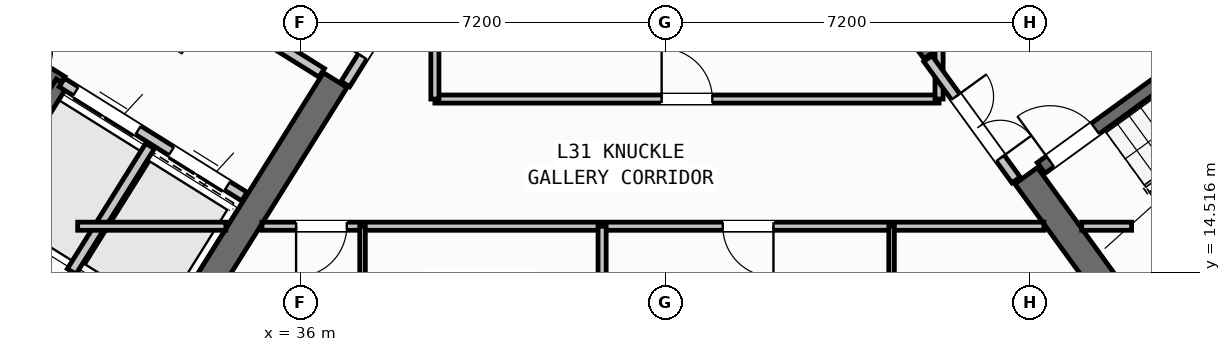
"""IFC4 building model, lengths in metres.
Left out: names, types, materials, properties, quantities, classifications, styles, units other than length and angle.
Written with IfcOpenShell. Run it as: python <this file> out.ifc"""

import sys

from ifc_helpers import new_model, si_unit, direction, frame, frame_2d, origin, place, context, subcontext, project, spatial, rectangle, extrude, source, transform, mapped, element, fill, save


model = new_model("IFC4")
c1 = context("Model", 3, precision=1e-05, world=origin(), true_north=direction((0.0, 1.0)))
c2 = subcontext(c1, "Body", "Model", "MODEL_VIEW")
j1 = project(units=[si_unit("LENGTHUNIT", "METRE"), si_unit("PLANEANGLEUNIT", "RADIAN")], contexts=[c1])
p1 = place(None, origin())
s1 = spatial("IfcSite", under=j1, at=p1, CompositionType="ELEMENT")
p2 = place(p1, origin())
s2 = spatial("IfcBuilding", under=s1, at=p2, CompositionType="ELEMENT")
p3 = place(p2, frame((0.0, 0.0, 123.3)))
s3 = spatial("IfcBuildingStorey", under=s2, at=p3, CompositionType="ELEMENT", Elevation=123.3)
p4 = place(p3, frame((33.366, 12.477, 0.0), z_axis=(0.0, 0.0, 1.0), x_axis=(-0.848047359947, 0.529920442413, 0.0)))
e1 = element("IfcWall", 1, at=p4, inside=s3, PredefinedType="SHEAR", context=c2, shape_type="SweptSolid", body=[
    extrude(rectangle(XDim=13.14, YDim=0.55, at=frame_2d((6.57, 0.0))), origin(), (0.0, 0.0, 1.0), 4.22),
])
p5 = place(p3, frame((36.683, 18.304, 0.0), z_axis=(0.0, 0.0, 1.0), x_axis=(-0.529896466841, -0.848062341122, 0.0)))
e2 = element("IfcWall", 2, at=p5, inside=s3, PredefinedType="SHEAR", context=c2, shape_type="SweptSolid", body=[
    extrude(rectangle(XDim=6.425, YDim=0.55, at=frame_2d((3.212, 0.0))), origin(), (0.0, 0.0, 1.0), 4.22),
])
p6 = place(p3, frame((52.359, 13.14, 0.0), z_axis=(0.0, 0.0, 1.0), x_axis=(0.809014896919, 0.587788139183, 0.0)))
e3 = element("IfcWall", 3, at=p6, inside=s3, PredefinedType="SHEAR", context=c2, shape_type="SweptSolid", body=[
    extrude(rectangle(XDim=12.34, YDim=0.55, at=frame_2d((6.17, 0.0))), origin(), (0.0, 0.0, 1.0), 4.22),
])
p7 = place(p3, frame((52.42, 13.524, 0.0), z_axis=(0.0, 0.0, 1.0), x_axis=(-0.587802113096, 0.809004744015, 0.0)))
e4 = element("IfcWall", 4, at=p7, inside=s3, PredefinedType="SHEAR", context=c2, shape_type="SweptSolid", body=[
    extrude(rectangle(XDim=3.575, YDim=0.55, at=frame_2d((1.788, 0.0))), origin(), (0.0, 0.0, 1.0), 4.22),
])
p8 = place(p3, frame((48.526, 18.884, 0.0), z_axis=(0.0, 0.0, 1.0), x_axis=(-0.587764933797, 0.809031756236, 0.0)))
e5 = element("IfcWall", 5, at=p8, inside=s3, PredefinedType="SHEAR", context=c2, shape_type="SweptSolid", body=[
    extrude(rectangle(XDim=6.425, YDim=0.55, at=frame_2d((3.212, 0.0))), origin(), (0.0, 0.0, 1.0), 4.22),
])
p9 = place(p3, frame((31.76, 12.183, 0.0), z_axis=(0.0, 0.0, 1.0), x_axis=(-0.848047074256, 0.529920899612, 0.0)))
e6 = element("IfcWall", 6, at=p9, inside=s3, PredefinedType="STANDARD", context=c2, shape_type="SweptSolid", body=[
    extrude(rectangle(XDim=30.652, YDim=0.32, at=frame_2d((15.326, 0.0))), origin(), (0.0, 0.0, 1.0), 4.22),
])
p10 = place(p9, frame((14.966, 0.0, 0.0)))
e7 = element("IfcOpeningElement", 7, at=p10, cuts=e6, PredefinedType="OPENING", context=c2, shape_type="SweptSolid", body=[
    extrude(rectangle(XDim=1.2, YDim=2.15, at=frame_2d((0.6, 1.075))), frame((0.0, 0.17, 0.0), z_axis=(0.0, -1.0, 0.0), x_axis=(1.0, 0.0, 0.0)), (0.0, 0.0, 1.0), 0.34),
])
p11 = place(p9, frame((1.871, 0.0, 0.8)))
e8 = element("IfcOpeningElement", 8, at=p11, cuts=e6, PredefinedType="OPENING", context=c2, shape_type="SweptSolid", body=[
    extrude(rectangle(XDim=2.1, YDim=1.55, at=frame_2d((1.05, 0.775))), frame((0.0, 0.17, 0.0), z_axis=(0.0, -1.0, 0.0), x_axis=(1.0, 0.0, 0.0)), (0.0, 0.0, 1.0), 0.34),
])
p12 = place(p9, frame((6.546, 0.0, 0.8)))
e9 = element("IfcOpeningElement", 9, at=p12, cuts=e6, PredefinedType="OPENING", context=c2, shape_type="SweptSolid", body=[
    extrude(rectangle(XDim=2.1, YDim=1.55, at=frame_2d((1.05, 0.775))), frame((0.0, 0.17, 0.0), z_axis=(0.0, -1.0, 0.0), x_axis=(1.0, 0.0, 0.0)), (0.0, 0.0, 1.0), 0.34),
])
p13 = place(p9, frame((20.508, 0.0, 0.85)))
e10 = element("IfcOpeningElement", 10, at=p13, cuts=e6, PredefinedType="OPENING", context=c2, shape_type="SweptSolid", body=[
    extrude(rectangle(XDim=1.5, YDim=1.5, at=frame_2d((0.75, 0.75))), frame((0.0, 0.17, 0.0), z_axis=(0.0, -1.0, 0.0), x_axis=(1.0, 0.0, 0.0)), (0.0, 0.0, 1.0), 0.34),
])
p14 = place(p9, frame((27.253, 0.0, 0.95)))
e11 = element("IfcOpeningElement", 11, at=p14, cuts=e6, PredefinedType="OPENING", context=c2, shape_type="SweptSolid", body=[
    extrude(rectangle(XDim=1.2, YDim=1.4, at=frame_2d((0.6, 0.7))), frame((0.0, 0.17, 0.0), z_axis=(0.0, -1.0, 0.0), x_axis=(1.0, 0.0, 0.0)), (0.0, 0.0, 1.0), 0.34),
])
p15 = place(p3, frame((31.28, 18.261, 0.0), z_axis=(0.0, 0.0, 1.0), x_axis=(-0.848051618787, 0.529913626805, 0.0)))
e12 = element("IfcWall", 12, at=p15, inside=s3, PredefinedType="SHEAR", context=c2, shape_type="SweptSolid", body=[
    extrude(rectangle(XDim=7.46, YDim=0.26, at=frame_2d((3.73, 0.0))), origin(), (0.0, 0.0, 1.0), 4.22),
])
p16 = place(p15, frame((0.36, 0.0, 0.0)))
e13 = element("IfcOpeningElement", 13, at=p16, cuts=e12, PredefinedType="OPENING", context=c2, shape_type="SweptSolid", body=[
    extrude(rectangle(XDim=0.86, YDim=2.05, at=frame_2d((0.43, 1.025))), frame((0.0, 0.14, 0.0), z_axis=(0.0, -1.0, 0.0), x_axis=(1.0, 0.0, 0.0)), (0.0, 0.0, 1.0), 0.28),
])
p17 = place(p3, frame((31.288, 18.256, 0.0), z_axis=(0.0, 0.0, 1.0), x_axis=(-0.529943379326, -0.848033026897, 0.0)))
e14 = element("IfcWall", 14, at=p17, inside=s3, PredefinedType="SHEAR", context=c2, shape_type="SweptSolid", body=[
    extrude(rectangle(XDim=3.16, YDim=0.26, at=frame_2d((1.58, 0.0))), origin(), (0.0, 0.0, 1.0), 4.22),
])
p18 = place(p3, frame((34.891, 16.005, 0.0), z_axis=(0.0, 0.0, 1.0), x_axis=(-0.848062873452, 0.529895614884, 0.0)))
e15 = element("IfcWall", 15, at=p18, inside=s3, PredefinedType="STANDARD", context=c2, shape_type="SweptSolid", body=[
    extrude(rectangle(XDim=4.248, YDim=0.2, at=frame_2d((2.124, 0.0))), origin(), (0.0, 0.0, 1.0), 4.21),
])
p19 = place(p18, frame((0.398, 0.0, 0.0)))
e16 = element("IfcOpeningElement", 16, at=p19, cuts=e15, PredefinedType="OPENING", context=c2, shape_type="SweptSolid", body=[
    extrude(rectangle(XDim=1.3, YDim=2.2, at=frame_2d((0.65, 1.1))), frame((0.0, 0.11, 0.0), z_axis=(0.0, -1.0, 0.0), x_axis=(1.0, 0.0, 0.0)), (0.0, 0.0, 1.0), 0.22),
])
p20 = place(p18, frame((2.473, 0.0, 0.0)))
e17 = element("IfcOpeningElement", 17, at=p20, cuts=e15, PredefinedType="OPENING", context=c2, shape_type="SweptSolid", body=[
    extrude(rectangle(XDim=1.45, YDim=2.25, at=frame_2d((0.725, 1.125))), frame((0.0, 0.11, 0.0), z_axis=(0.0, -1.0, 0.0), x_axis=(1.0, 0.0, 0.0)), (0.0, 0.0, 1.0), 0.22),
])
p21 = place(p3, frame((36.417, 18.447, 0.0), z_axis=(0.0, 0.0, 1.0), x_axis=(-0.848064879198, 0.529892404805, 0.0)))
e18 = element("IfcWall", 18, at=p21, inside=s3, PredefinedType="STANDARD", context=c2, shape_type="SweptSolid", body=[
    extrude(rectangle(XDim=5.768, YDim=0.2, at=frame_2d((2.884, 0.0))), origin(), (0.0, 0.0, 1.0), 4.21),
])
p22 = place(p21, frame((2.548, 0.0, 0.0)))
e19 = element("IfcOpeningElement", 19, at=p22, cuts=e18, PredefinedType="OPENING", context=c2, shape_type="SweptSolid", body=[
    extrude(rectangle(XDim=1.15, YDim=2.1, at=frame_2d((0.575, 1.05))), frame((0.0, 0.11, 0.0), z_axis=(0.0, -1.0, 0.0), x_axis=(1.0, 0.0, 0.0)), (0.0, 0.0, 1.0), 0.22),
])
p23 = place(p3, frame((33.029, 17.003, 0.0), z_axis=(0.0, 0.0, 1.0), x_axis=(-0.529916267533, -0.848049968695, 0.0)))
e20 = element("IfcWall", 20, at=p23, inside=s3, PredefinedType="STANDARD", context=c2, shape_type="SweptSolid", body=[
    extrude(rectangle(XDim=2.92, YDim=0.2, at=frame_2d((1.46, 0.0))), origin(), (0.0, 0.0, 1.0), 4.21),
])
p24 = place(p3, frame((52.472, 14.013, 0.0), z_axis=(0.0, 0.0, 1.0), x_axis=(0.809028366311, 0.587769599847, 0.0)))
e21 = element("IfcWall", 21, at=p24, inside=s3, PredefinedType="SHEAR", context=c2, shape_type="SweptSolid", body=[
    extrude(rectangle(XDim=7.33, YDim=0.26, at=frame_2d((3.665, 0.0))), origin(), (0.0, 0.0, 1.0), 4.22),
])
p25 = place(p3, frame((50.615, 16.57, 0.0), z_axis=(0.0, 0.0, 1.0), x_axis=(0.809028366311, 0.587769599847, 0.0)))
e22 = element("IfcWall", 22, at=p25, inside=s3, PredefinedType="SHEAR", context=c2, shape_type="SweptSolid", body=[
    extrude(rectangle(XDim=7.33, YDim=0.26, at=frame_2d((3.665, 0.0))), origin(), (0.0, 0.0, 1.0), 4.22),
])
p26 = place(p25, frame((0.22, 0.0, 0.0)))
e23 = element("IfcOpeningElement", 23, at=p26, cuts=e22, PredefinedType="OPENING", context=c2, shape_type="SweptSolid", body=[
    extrude(rectangle(XDim=1.1, YDim=2.1, at=frame_2d((0.55, 1.05))), frame((0.0, 0.14, 0.0), z_axis=(0.0, -1.0, 0.0), x_axis=(1.0, 0.0, 0.0)), (0.0, 0.0, 1.0), 0.28),
])
p27 = place(p3, frame((38.451, 20.737, 0.0), z_axis=(0.0, 0.0, 1.0), x_axis=(-0.529924799939, -0.848044637038, 0.0)))
e24 = element("IfcWall", 24, at=p27, inside=s3, PredefinedType="STANDARD", context=c2, shape_type="SweptSolid", body=[
    extrude(rectangle(XDim=2.96, YDim=0.2, at=frame_2d((1.48, 0.0))), origin(), (0.0, 0.0, 1.0), 2.395),
])
p28 = place(p27, frame((1.46, 0.0, 0.0)))
e25 = element("IfcOpeningElement", 25, at=p28, cuts=e24, PredefinedType="OPENING", context=c2, shape_type="SweptSolid", body=[
    extrude(rectangle(XDim=0.86, YDim=2.05, at=frame_2d((0.43, 1.025))), frame((0.0, 0.11, 0.0), z_axis=(0.0, -1.0, 0.0), x_axis=(1.0, 0.0, 0.0)), (0.0, 0.0, 1.0), 0.22),
])
p29 = place(p3, frame((31.6, 15.42, 0.0), z_axis=(0.0, 0.0, 1.0), x_axis=(1.0, 0.0, 0.0)))
e26 = element("IfcWall", 26, at=p29, inside=s3, PredefinedType="PARTITIONING", context=c2, shape_type="SweptSolid", body=[
    extrude(rectangle(XDim=2.925, YDim=0.16, at=frame_2d((1.462, 0.0))), origin(), (0.0, 0.0, 1.0), 4.21),
])
p30 = place(p3, frame((35.237, 15.42, 0.0), z_axis=(0.0, 0.0, 1.0), x_axis=(1.0, 0.0, 0.0)))
e27 = element("IfcWall", 27, at=p30, inside=s3, PredefinedType="PARTITIONING", context=c2, shape_type="SweptSolid", body=[
    extrude(rectangle(XDim=15.432, YDim=0.16, at=frame_2d((7.716, 0.0))), origin(), (0.0, 0.0, 1.0), 4.21),
])
p31 = place(p30, frame((0.674, 0.0, 0.0)))
e28 = element("IfcOpeningElement", 28, at=p31, cuts=e27, PredefinedType="OPENING", context=c2, shape_type="SweptSolid", body=[
    extrude(rectangle(XDim=1.0, YDim=2.1, at=frame_2d((0.5, 1.05))), frame((0.0, 0.09, 0.0), z_axis=(0.0, -1.0, 0.0), x_axis=(1.0, 0.0, 0.0)), (0.0, 0.0, 1.0), 0.18),
])
p32 = place(p30, frame((9.094, 0.0, 0.0)))
e29 = element("IfcOpeningElement", 29, at=p32, cuts=e27, PredefinedType="OPENING", context=c2, shape_type="SweptSolid", body=[
    extrude(rectangle(XDim=1.0, YDim=2.1, at=frame_2d((0.5, 1.05))), frame((0.0, 0.09, 0.0), z_axis=(0.0, -1.0, 0.0), x_axis=(1.0, 0.0, 0.0)), (0.0, 0.0, 1.0), 0.18),
])
p33 = place(p3, frame((51.416, 15.42, 0.0), z_axis=(0.0, 0.0, 1.0), x_axis=(1.0, 0.0, 0.0)))
e30 = element("IfcWall", 30, at=p33, inside=s3, PredefinedType="PARTITIONING", context=c2, shape_type="SweptSolid", body=[
    extrude(rectangle(XDim=0.984, YDim=0.16, at=frame_2d((0.492, 0.0))), origin(), (0.0, 0.0, 1.0), 4.21),
])
p34 = place(p3, frame((38.65, 17.93, 0.0), z_axis=(0.0, 0.0, 1.0), x_axis=(1.0, 0.0, 0.0)))
e31 = element("IfcWall", 31, at=p34, inside=s3, PredefinedType="PARTITIONING", context=c2, shape_type="SweptSolid", body=[
    extrude(rectangle(XDim=9.95, YDim=0.16, at=frame_2d((4.975, 0.0))), origin(), (0.0, 0.0, 1.0), 4.21),
])
p35 = place(p34, frame((4.475, 0.0, 0.0)))
e32 = element("IfcOpeningElement", 32, at=p35, cuts=e31, PredefinedType="OPENING", context=c2, shape_type="SweptSolid", body=[
    extrude(rectangle(XDim=1.0, YDim=2.1, at=frame_2d((0.5, 1.05))), frame((0.0, 0.09, 0.0), z_axis=(0.0, -1.0, 0.0), x_axis=(1.0, 0.0, 0.0)), (0.0, 0.0, 1.0), 0.18),
])
p36 = place(p3, frame((38.65, 17.93, 0.0), z_axis=(0.0, 0.0, 1.0), x_axis=(0.0, 1.0, 0.0)))
e33 = element("IfcWall", 33, at=p36, inside=s3, PredefinedType="PARTITIONING", context=c2, shape_type="SweptSolid", body=[
    extrude(rectangle(XDim=2.951, YDim=0.16, at=frame_2d((1.476, 0.0))), origin(), (0.0, 0.0, 1.0), 4.21),
])
p37 = place(p3, frame((48.6, 17.93, 0.0), z_axis=(0.0, 0.0, 1.0), x_axis=(0.0, 1.0, 0.0)))
e34 = element("IfcWall", 34, at=p37, inside=s3, PredefinedType="PARTITIONING", context=c2, shape_type="SweptSolid", body=[
    extrude(rectangle(XDim=0.993, YDim=0.16, at=frame_2d((0.496, 0.0))), origin(), (0.0, 0.0, 1.0), 4.21),
])
p38 = place(p3, frame((50.119, 16.333, 0.0), z_axis=(0.0, 0.0, 1.0), x_axis=(-0.587749856981, 0.809042709391, 0.0)))
e35 = element("IfcWall", 35, at=p38, inside=s3, PredefinedType="STANDARD", context=c2, shape_type="SweptSolid", body=[
    extrude(rectangle(XDim=2.96, YDim=0.2, at=frame_2d((1.48, 0.0))), origin(), (0.0, 0.0, 1.0), 2.395),
])
p39 = place(p38, frame((0.53, 0.0, 0.0)))
e36 = element("IfcOpeningElement", 36, at=p39, cuts=e35, PredefinedType="OPENING", context=c2, shape_type="SweptSolid", body=[
    extrude(rectangle(XDim=1.5, YDim=2.15, at=frame_2d((0.75, 1.075))), frame((0.0, 0.11, 0.0), z_axis=(0.0, -1.0, 0.0), x_axis=(1.0, 0.0, 0.0)), (0.0, 0.0, 1.0), 0.22),
])
p40 = place(p3, frame((41.95, 1.96, 0.0), z_axis=(0.0, 0.0, 1.0), x_axis=(0.0, 1.0, 0.0)))
e37 = element("IfcWall", 37, at=p40, inside=s3, PredefinedType="PARTITIONING", context=c2, shape_type="SweptSolid", body=[
    extrude(rectangle(XDim=13.46, YDim=0.16, at=frame_2d((6.73, 0.0))), origin(), (0.0, 0.0, 1.0), 4.21),
])
p41 = place(p3, frame((37.222, 1.96, 0.0), z_axis=(0.0, 0.0, 1.0), x_axis=(0.0, 1.0, 0.0)))
e38 = element("IfcWall", 38, at=p41, inside=s3, PredefinedType="PARTITIONING", context=c2, shape_type="SweptSolid", body=[
    extrude(rectangle(XDim=13.46, YDim=0.11, at=frame_2d((6.73, 0.0))), origin(), (0.0, 0.0, 1.0), 4.21),
])
p42 = place(p41, frame((5.2, 0.0, 0.0)))
e39 = element("IfcOpeningElement", 39, at=p42, cuts=e38, PredefinedType="OPENING", context=c2, shape_type="SweptSolid", body=[
    extrude(rectangle(XDim=0.92, YDim=2.08, at=frame_2d((0.46, 1.04))), frame((0.0, 0.065, 0.0), z_axis=(0.0, -1.0, 0.0), x_axis=(1.0, 0.0, 0.0)), (0.0, 0.0, 1.0), 0.13),
])
p43 = place(p41, frame((10.45, 0.0, 0.0)))
e40 = element("IfcOpeningElement", 40, at=p43, cuts=e38, PredefinedType="OPENING", context=c2, shape_type="SweptSolid", body=[
    extrude(rectangle(XDim=0.88, YDim=2.08, at=frame_2d((0.44, 1.04))), frame((0.0, 0.065, 0.0), z_axis=(0.0, -1.0, 0.0), x_axis=(1.0, 0.0, 0.0)), (0.0, 0.0, 1.0), 0.13),
])
p44 = place(p3, frame((47.663, 1.96, 0.0), z_axis=(0.0, 0.0, 1.0), x_axis=(0.0, 1.0, 0.0)))
e41 = element("IfcWall", 41, at=p44, inside=s3, PredefinedType="PARTITIONING", context=c2, shape_type="SweptSolid", body=[
    extrude(rectangle(XDim=13.46, YDim=0.11, at=frame_2d((6.73, 0.0))), origin(), (0.0, 0.0, 1.0), 4.21),
])
p45 = place(p44, frame((6.3, 0.0, 0.0)))
e42 = element("IfcOpeningElement", 42, at=p45, cuts=e41, PredefinedType="OPENING", context=c2, shape_type="SweptSolid", body=[
    extrude(rectangle(XDim=0.92, YDim=2.08, at=frame_2d((0.46, 1.04))), frame((0.0, 0.065, 0.0), z_axis=(0.0, -1.0, 0.0), x_axis=(1.0, 0.0, 0.0)), (0.0, 0.0, 1.0), 0.13),
])
p46 = place(p44, frame((11.1, 0.0, 0.0)))
e43 = element("IfcOpeningElement", 43, at=p46, cuts=e41, PredefinedType="OPENING", context=c2, shape_type="SweptSolid", body=[
    extrude(rectangle(XDim=0.88, YDim=2.08, at=frame_2d((0.44, 1.04))), frame((0.0, 0.065, 0.0), z_axis=(0.0, -1.0, 0.0), x_axis=(1.0, 0.0, 0.0)), (0.0, 0.0, 1.0), 0.13),
])
m1 = source(origin(), c2, "Body", "SweptSolid", [
    extrude(rectangle(XDim=1.3, YDim=2.2, at=frame_2d((0.65, 1.1))), frame((0.0, 0.025, 0.0), z_axis=(0.0, -1.0, 0.0), x_axis=(1.0, 0.0, 0.0)), (0.0, 0.0, 1.0), 0.05),
])
p47 = place(p19, origin())
e44 = element("IfcDoor", 44, at=p47, inside=s3, OperationType="DOUBLE_DOOR_SLIDING", PredefinedType="DOOR", context=c2, shape_type="MappedRepresentation", body=[
    mapped(m1, transform((0.0, 0.0, 0.0), scale=1.0)),
])
fill(e16, e44)
m2 = source(origin(), c2, "Body", "SweptSolid", [
    extrude(rectangle(XDim=1.45, YDim=2.25, at=frame_2d((0.725, 1.125))), frame((0.0, 0.025, 0.0), z_axis=(0.0, -1.0, 0.0), x_axis=(1.0, 0.0, 0.0)), (0.0, 0.0, 1.0), 0.05),
])
p48 = place(p20, origin())
e45 = element("IfcDoor", 45, at=p48, inside=s3, OperationType="DOUBLE_DOOR_SLIDING", PredefinedType="DOOR", context=c2, shape_type="MappedRepresentation", body=[
    mapped(m2, transform((0.0, 0.0, 0.0), scale=1.0)),
])
fill(e17, e45)
m3 = source(origin(), c2, "Body", "SweptSolid", [
    extrude(rectangle(XDim=1.1, YDim=2.1, at=frame_2d((0.55, 1.05))), frame((0.0, 0.025, 0.0), z_axis=(0.0, -1.0, 0.0), x_axis=(1.0, 0.0, 0.0)), (0.0, 0.0, 1.0), 0.05),
])
p49 = place(p26, origin())
e46 = element("IfcDoor", 46, at=p49, inside=s3, OperationType="SINGLE_SWING_LEFT", PredefinedType="DOOR", context=c2, shape_type="MappedRepresentation", body=[
    mapped(m3, transform((0.0, 0.0, 0.0), scale=1.0)),
])
fill(e23, e46)
m4 = source(origin(), c2, "Body", "SweptSolid", [
    extrude(rectangle(XDim=1.0, YDim=2.1, at=frame_2d((0.5, 1.05))), frame((0.0, 0.025, 0.0), z_axis=(0.0, -1.0, 0.0), x_axis=(1.0, 0.0, 0.0)), (0.0, 0.0, 1.0), 0.05),
])
p50 = place(p35, origin())
e47 = element("IfcDoor", 47, at=p50, inside=s3, OperationType="SINGLE_SWING_LEFT", PredefinedType="DOOR", context=c2, shape_type="MappedRepresentation", body=[
    mapped(m4, transform((0.0, 0.0, 0.0), scale=1.0)),
])
fill(e32, e47)
m5 = source(origin(), c2, "Body", "SweptSolid", [
    extrude(rectangle(XDim=0.86, YDim=2.05, at=frame_2d((0.43, 1.025))), frame((0.0, 0.025, 0.0), z_axis=(0.0, -1.0, 0.0), x_axis=(1.0, 0.0, 0.0)), (0.0, 0.0, 1.0), 0.05),
])
p51 = place(p28, frame((0.86, 0.0, 0.0), z_axis=(0.0, 0.0, 1.0), x_axis=(-1.0, 0.0, 0.0)))
e48 = element("IfcDoor", 48, at=p51, inside=s3, OperationType="SINGLE_SWING_LEFT", PredefinedType="DOOR", context=c2, shape_type="MappedRepresentation", body=[
    mapped(m5, transform((0.0, 0.0, 0.0), scale=1.0)),
])
fill(e25, e48)
m6 = source(origin(), c2, "Body", "SweptSolid", [
    extrude(rectangle(XDim=1.5, YDim=2.15, at=frame_2d((0.75, 1.075))), frame((0.0, 0.025, 0.0), z_axis=(0.0, -1.0, 0.0), x_axis=(1.0, 0.0, 0.0)), (0.0, 0.0, 1.0), 0.05),
])
p52 = place(p39, frame((1.5, 0.0, 0.0), z_axis=(0.0, 0.0, 1.0), x_axis=(-1.0, 0.0, 0.0)))
e49 = element("IfcDoor", 49, at=p52, inside=s3, OperationType="DOUBLE_DOOR_SINGLE_SWING", PredefinedType="DOOR", context=c2, shape_type="MappedRepresentation", body=[
    mapped(m6, transform((0.0, 0.0, 0.0), scale=1.0)),
])
fill(e36, e49)
p53 = place(p31, frame((1.0, 0.0, 0.0), z_axis=(0.0, 0.0, 1.0), x_axis=(-1.0, 0.0, 0.0)))
e50 = element("IfcDoor", 50, at=p53, inside=s3, OperationType="SINGLE_SWING_RIGHT", PredefinedType="DOOR", context=c2, shape_type="MappedRepresentation", body=[
    mapped(m4, transform((0.0, 0.0, 0.0), scale=1.0)),
])
fill(e28, e50)
p54 = place(p32, frame((1.0, 0.0, 0.0), z_axis=(0.0, 0.0, 1.0), x_axis=(-1.0, 0.0, 0.0)))
e51 = element("IfcDoor", 51, at=p54, inside=s3, OperationType="SINGLE_SWING_LEFT", PredefinedType="DOOR", context=c2, shape_type="MappedRepresentation", body=[
    mapped(m4, transform((0.0, 0.0, 0.0), scale=1.0)),
])
fill(e29, e51)
save(model, sys.argv[1])
